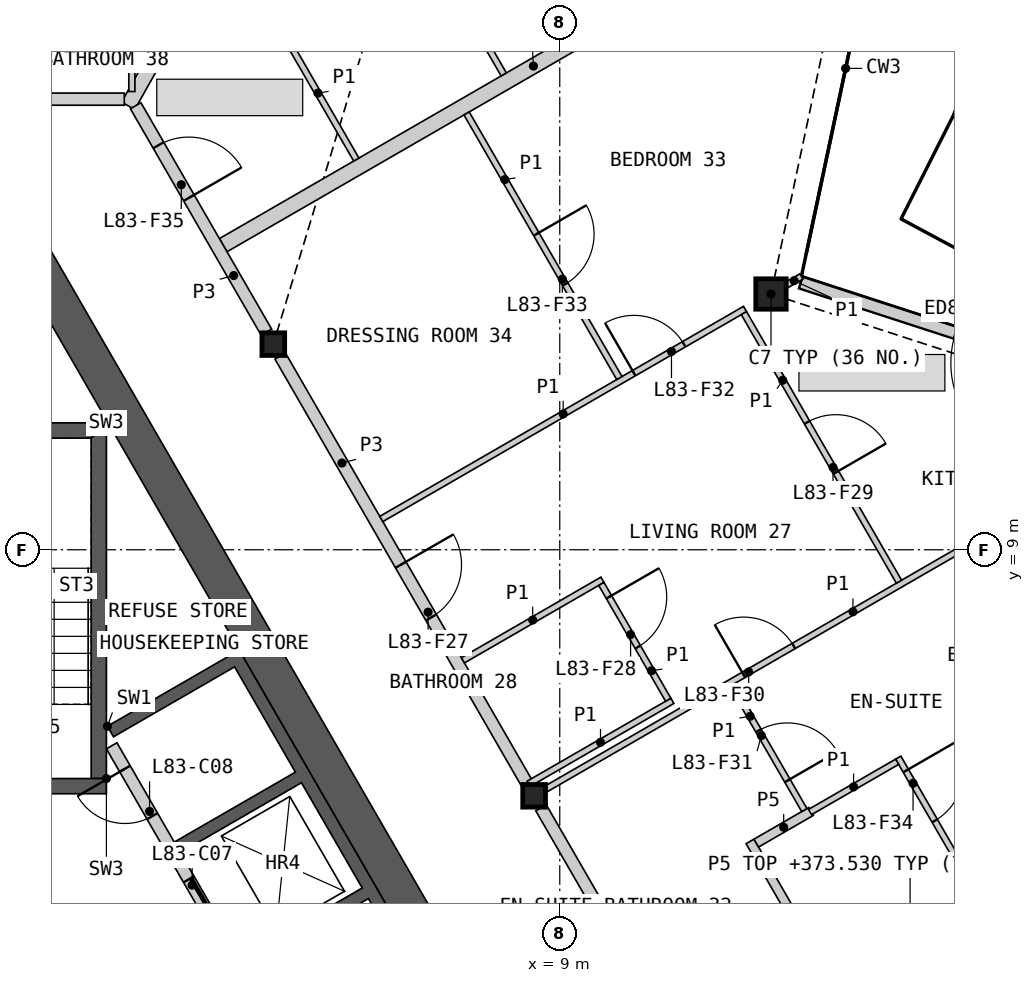
"""IFC4 building model, lengths in metres.
Left out: names, types, materials, properties, quantities, classifications, styles, units other than length and angle.
Written with IfcOpenShell. Run it as: python <this file> out.ifc"""

import sys

from ifc_helpers import new_model, si_unit, direction, frame, frame_2d, origin, origin_2d, place, context, subcontext, project, spatial, polyline, rectangle, hollow_rectangle, i_section, outline, extrude, element, fill, save


model = new_model("IFC4")
c1 = context("Model", 3, precision=1e-05, world=origin(), true_north=direction((0.0, 1.0)))
c2 = subcontext(c1, "Body", "Model", "MODEL_VIEW")
j1 = project(units=[si_unit("LENGTHUNIT", "METRE"), si_unit("PLANEANGLEUNIT", "RADIAN")], contexts=[c1])
p1 = place(None, origin())
s1 = spatial("IfcSite", under=j1, at=p1, CompositionType="ELEMENT")
p2 = place(p1, origin())
s2 = spatial("IfcBuilding", under=s1, at=p2, CompositionType="ELEMENT")
p3 = place(p2, frame((0.0, 0.0, 371.2)))
s3 = spatial("IfcBuildingStorey", under=s2, at=p3, CompositionType="ELEMENT", Elevation=371.2)
p4 = place(p3, frame((12.474, 13.206, 0.0), z_axis=(0.0, 0.0, 1.0), x_axis=(1.0, 0.0, 0.0)))
e1 = element("IfcColumn", 1, at=p4, inside=s3, PredefinedType="COLUMN", context=c2, shape_type="SweptSolid", body=[
    extrude(hollow_rectangle(XDim=0.5, YDim=0.5, WallThickness=0.03, at=origin_2d()), origin(), (0.0, 0.0, 1.0), 3.4),
])
for number, where, z_axis, x_axis in (
    (2, (8.578, 4.953, 0.0), (0.0, 0.0, 1.0), (1.0, 0.0, 0.0)),
    (3, (4.289, 12.382, 0.0), (0.0, 0.0, 1.0), (1.0, 0.0, 0.0)),
):
    element("IfcColumn", number, at=place(p3, frame(where, z_axis=z_axis, x_axis=x_axis)), inside=s3, PredefinedType="COLUMN", context=c2, shape_type="SweptSolid", body=[
        extrude(i_section(OverallWidth=0.374, OverallDepth=0.372, WebThickness=0.016, FlangeThickness=0.026, at=origin_2d()), origin(), (0.0, 0.0, 1.0), 3.4),
    ])
p5 = place(p3, frame((19.25, 11.351, 0.0), z_axis=(0.0, 0.0, 1.0), x_axis=(-0.951060668786, 0.309004214029, 0.0)))
e4 = element("IfcWall", 4, at=p5, inside=s3, PredefinedType="SOLIDWALL", context=c2, shape_type="SweptSolid", body=[
    extrude(rectangle(XDim=6.609, YDim=0.2, at=frame_2d((3.305, 0.0))), origin(), (0.0, 0.0, 1.0), 2.634),
])
p6 = place(p5, frame((2.333, 0.0, 0.0)))
e5 = element("IfcOpeningElement", 5, at=p6, cuts=e4, PredefinedType="OPENING", context=c2, shape_type="SweptSolid", body=[
    extrude(rectangle(XDim=1.6, YDim=2.25, at=frame_2d((0.8, 1.125))), frame((0.0, 0.11, 0.0), z_axis=(0.0, -1.0, 0.0), x_axis=(1.0, 0.0, 0.0)), (0.0, 0.0, 1.0), 0.22),
])
p7 = place(p3, origin())
e6 = element("IfcWall", 6, at=p7, inside=s3, PredefinedType="SHEAR", context=c2, shape_type="SweptSolid", body=[
    extrude(outline(polyline([(1.561, 6.097), (3.731, 7.35), (8.231, -0.444), (6.061, -1.697), (5.96, -1.524), (7.952, -0.374), (6.952, 1.358), (4.96, 0.208), (4.861, 0.381), (6.852, 1.531), (5.852, 3.263), (3.861, 2.113), (3.76, 2.287), (5.752, 3.437), (4.752, 5.169), (2.76, 4.019), (2.66, 4.192), (4.652, 5.342), (3.652, 7.074), (1.66, 5.924), (1.561, 6.097)])), origin(), (0.0, 0.0, 1.0), 3.1),
])
p8 = place(p3, frame((5.817, -1.476, 0.0), z_axis=(0.0, 0.0, 1.0), x_axis=(-0.500002616675, 0.866023893041, 0.0)))
e7 = element("IfcWall", 7, at=p8, inside=s3, PredefinedType="SOLIDWALL", context=c2, shape_type="SweptSolid", body=[
    extrude(rectangle(XDim=8.373, YDim=0.2, at=frame_2d((4.187, 0.0))), origin(), (0.0, 0.0, 1.0), 3.1),
])
p9 = place(p8, frame((0.337, 0.0, 0.0)))
e8 = element("IfcOpeningElement", 8, at=p9, cuts=e7, PredefinedType="OPENING", context=c2, shape_type="SweptSolid", body=[
    extrude(rectangle(XDim=1.1, YDim=2.1, at=frame_2d((0.55, 1.05))), frame((0.0, 0.11, 0.0), z_axis=(0.0, -1.0, 0.0), x_axis=(1.0, 0.0, 0.0)), (0.0, 0.0, 1.0), 0.22),
])
p10 = place(p8, frame((2.537, 0.0, 0.0)))
e9 = element("IfcOpeningElement", 9, at=p10, cuts=e7, PredefinedType="OPENING", context=c2, shape_type="SweptSolid", body=[
    extrude(rectangle(XDim=1.1, YDim=2.1, at=frame_2d((0.55, 1.05))), frame((0.0, 0.11, 0.0), z_axis=(0.0, -1.0, 0.0), x_axis=(1.0, 0.0, 0.0)), (0.0, 0.0, 1.0), 0.22),
])
p11 = place(p8, frame((4.737, 0.0, 0.0)))
e10 = element("IfcOpeningElement", 10, at=p11, cuts=e7, PredefinedType="OPENING", context=c2, shape_type="SweptSolid", body=[
    extrude(rectangle(XDim=1.1, YDim=2.1, at=frame_2d((0.55, 1.05))), frame((0.0, 0.11, 0.0), z_axis=(0.0, -1.0, 0.0), x_axis=(1.0, 0.0, 0.0)), (0.0, 0.0, 1.0), 0.22),
])
p12 = place(p8, frame((7.037, 0.0, 0.0)))
e11 = element("IfcOpeningElement", 11, at=p12, cuts=e7, PredefinedType="OPENING", context=c2, shape_type="SweptSolid", body=[
    extrude(rectangle(XDim=0.9, YDim=2.1, at=frame_2d((0.45, 1.05))), frame((0.0, 0.11, 0.0), z_axis=(0.0, -1.0, 0.0), x_axis=(1.0, 0.0, 0.0)), (0.0, 0.0, 1.0), 0.22),
])
p13 = place(p3, origin())
e12 = element("IfcWall", 12, at=p13, inside=s3, PredefinedType="SHEAR", context=c2, shape_type="SweptSolid", body=[
    extrude(outline(polyline([(1.544, 5.237), (1.544, 11.087), (1.294, 10.837), (1.294, 5.237), (1.544, 5.237)])), origin(), (0.0, 0.0, 1.0), 3.1),
])
p14 = place(p3, origin())
e13 = element("IfcWall", 13, at=p14, inside=s3, PredefinedType="SHEAR", context=c2, shape_type="SweptSolid", body=[
    extrude(outline(polyline([(1.544, 11.087), (-1.544, 11.087), (-1.294, 10.837), (1.294, 10.837), (1.544, 11.087)])), origin(), (0.0, 0.0, 1.0), 3.1),
])
p15 = place(p3, frame((1.544, 5.112, 0.0), z_axis=(0.0, 0.0, 1.0), x_axis=(-1.0, 0.0, 0.0)))
e14 = element("IfcWall", 14, at=p15, inside=s3, PredefinedType="SHEAR", context=c2, shape_type="SweptSolid", body=[
    extrude(rectangle(XDim=3.088, YDim=0.25, at=frame_2d((1.544, 0.0))), origin(), (0.0, 0.0, 1.0), 3.1),
])
p16 = place(p15, frame((0.994, 0.0, 0.0)))
e15 = element("IfcOpeningElement", 15, at=p16, cuts=e14, PredefinedType="OPENING", context=c2, shape_type="SweptSolid", body=[
    extrude(rectangle(XDim=1.1, YDim=2.1, at=frame_2d((0.55, 1.05))), frame((0.0, 0.135, 0.0), z_axis=(0.0, -1.0, 0.0), x_axis=(1.0, 0.0, 0.0)), (0.0, 0.0, 1.0), 0.27),
])
p17 = place(p3, frame((8.686, -0.634, 0.0), z_axis=(0.0, 0.0, 1.0), x_axis=(-0.500004601921, 0.866022746848, 0.0)))
e16 = element("IfcWall", 16, at=p17, inside=s3, PredefinedType="SHEAR", context=c2, shape_type="SweptSolid", body=[
    extrude(rectangle(XDim=16.853, YDim=0.6, at=frame_2d((8.426, 0.0))), origin(), (0.0, 0.0, 1.0), 3.1),
])
p18 = place(p3, frame((1.902, 16.302, 0.0), z_axis=(0.0, 0.0, 1.0), x_axis=(0.491233789602, 0.871027763021, 0.0)))
e17 = element("IfcWall", 17, at=p18, inside=s3, PredefinedType="PARTITIONING", context=c2, shape_type="SweptSolid", body=[
    extrude(rectangle(XDim=14.345, YDim=0.25, at=frame_2d((7.173, 0.0))), origin(), (0.0, 0.0, 1.0), 2.33),
])
p19 = place(p3, frame((3.465, 14.01, 0.0), z_axis=(0.0, 0.0, 1.0), x_axis=(0.866032376801, 0.499987922186, 0.0)))
e18 = element("IfcWall", 18, at=p19, inside=s3, PredefinedType="PARTITIONING", context=c2, shape_type="SweptSolid", body=[
    extrude(rectangle(XDim=11.782, YDim=0.25, at=frame_2d((5.891, 0.0))), origin(), (0.0, 0.0, 1.0), 2.33),
])
p20 = place(p3, frame((4.403, 12.185, 0.0), z_axis=(0.0, 0.0, 1.0), x_axis=(0.499992155518, -0.866029932751, 0.0)))
e19 = element("IfcWall", 19, at=p20, inside=s3, PredefinedType="PARTITIONING", context=c2, shape_type="SweptSolid", body=[
    extrude(rectangle(XDim=8.123, YDim=0.2, at=frame_2d((4.062, 0.0))), origin(), (0.0, 0.0, 1.0), 3.1),
])
p21 = place(p20, frame((3.963, 0.0, 0.0)))
e20 = element("IfcOpeningElement", 20, at=p21, cuts=e19, PredefinedType="OPENING", context=c2, shape_type="SweptSolid", body=[
    extrude(rectangle(XDim=1.0, YDim=2.1, at=frame_2d((0.5, 1.05))), frame((0.0, 0.11, 0.0), z_axis=(0.0, -1.0, 0.0), x_axis=(1.0, 0.0, 0.0)), (0.0, 0.0, 1.0), 0.22),
])
p22 = place(p3, frame((8.692, 4.756, 0.0), z_axis=(0.0, 0.0, 1.0), x_axis=(0.500001682468, -0.866024432409, 0.0)))
e21 = element("IfcWall", 21, at=p22, inside=s3, PredefinedType="PARTITIONING", context=c2, shape_type="SweptSolid", body=[
    extrude(rectangle(XDim=8.124, YDim=0.2, at=frame_2d((4.062, 0.0))), origin(), (0.0, 0.0, 1.0), 3.1),
])
p23 = place(p22, frame((5.97, 0.0, 0.0)))
e22 = element("IfcOpeningElement", 22, at=p23, cuts=e21, PredefinedType="OPENING", context=c2, shape_type="SweptSolid", body=[
    extrude(rectangle(XDim=1.0, YDim=2.1, at=frame_2d((0.5, 1.05))), frame((0.0, 0.11, 0.0), z_axis=(0.0, -1.0, 0.0), x_axis=(1.0, 0.0, 0.0)), (0.0, 0.0, 1.0), 0.22),
])
p24 = place(p3, frame((2.025, 16.303, 0.0), z_axis=(0.0, 0.0, 1.0), x_axis=(0.500004215162, -0.866022970146, 0.0)))
e23 = element("IfcWall", 23, at=p24, inside=s3, PredefinedType="PARTITIONING", context=c2, shape_type="SweptSolid", body=[
    extrude(rectangle(XDim=4.3, YDim=0.2, at=frame_2d((2.15, 0.0))), origin(), (0.0, 0.0, 1.0), 3.1),
])
p25 = place(p24, frame((0.75, 0.0, 0.0)))
e24 = element("IfcOpeningElement", 24, at=p25, cuts=e23, PredefinedType="OPENING", context=c2, shape_type="SweptSolid", body=[
    extrude(rectangle(XDim=1.0, YDim=2.1, at=frame_2d((0.5, 1.05))), frame((0.0, 0.11, 0.0), z_axis=(0.0, -1.0, 0.0), x_axis=(1.0, 0.0, 0.0)), (0.0, 0.0, 1.0), 0.22),
])
p26 = place(p3, frame((-1.863, 16.411, 0.0), z_axis=(0.0, 0.0, 1.0), x_axis=(1.0, 0.0, 0.0)))
e25 = element("IfcWall", 25, at=p26, inside=s3, PredefinedType="PARTITIONING", context=c2, shape_type="SweptSolid", body=[
    extrude(rectangle(XDim=3.701, YDim=0.2, at=frame_2d((1.851, 0.0))), origin(), (0.0, 0.0, 1.0), 3.1),
])
p27 = place(p26, frame((0.25, 0.0, 0.0)))
e26 = element("IfcOpeningElement", 26, at=p27, cuts=e25, PredefinedType="OPENING", context=c2, shape_type="SweptSolid", body=[
    extrude(rectangle(XDim=1.0, YDim=2.1, at=frame_2d((0.5, 1.05))), frame((0.0, 0.11, 0.0), z_axis=(0.0, -1.0, 0.0), x_axis=(1.0, 0.0, 0.0)), (0.0, 0.0, 1.0), 0.22),
])
p28 = place(p3, frame((13.625, 1.862, 0.0), z_axis=(0.0, 0.0, 1.0), x_axis=(0.866013657776, 0.500020344131, 0.0)))
e27 = element("IfcWall", 27, at=p28, inside=s3, PredefinedType="PLUMBINGWALL", context=c2, shape_type="SweptSolid", body=[
    extrude(rectangle(XDim=2.625, YDim=0.15, at=frame_2d((1.312, 0.0))), origin(), (0.0, 0.0, 1.0), 2.33),
])
p29 = place(p3, frame((12.129, 4.203, 0.0), z_axis=(0.0, 0.0, 1.0), x_axis=(0.499993606316, -0.866029095148, 0.0)))
e28 = element("IfcWall", 28, at=p29, inside=s3, PredefinedType="PLUMBINGWALL", context=c2, shape_type="SweptSolid", body=[
    extrude(rectangle(XDim=2.65, YDim=0.15, at=frame_2d((1.325, 0.0))), origin(), (0.0, 0.0, 1.0), 2.33),
])
p30 = place(p3, frame((12.232, 4.175, 0.0), z_axis=(0.0, 0.0, 1.0), x_axis=(0.866056787991, 0.499945637019, 0.0)))
e29 = element("IfcWall", 29, at=p30, inside=s3, PredefinedType="PLUMBINGWALL", context=c2, shape_type="SweptSolid", body=[
    extrude(rectangle(XDim=1.042, YDim=0.15, at=frame_2d((0.521, 0.0))), origin(), (0.0, 0.0, 1.0), 2.33),
])
p31 = place(p3, frame((8.775, 5.066, 0.0), z_axis=(0.0, 0.0, 1.0), x_axis=(0.866023724155, 0.500002909193, 0.0)))
e30 = element("IfcWall", 30, at=p31, inside=s3, PredefinedType="PARTITIONING", context=c2, shape_type="SweptSolid", body=[
    extrude(rectangle(XDim=11.655, YDim=0.1, at=frame_2d((5.827, 0.0))), origin(), (0.0, 0.0, 1.0), 2.33),
])
p32 = place(p31, frame((3.751, 0.0, 0.0)))
e31 = element("IfcOpeningElement", 31, at=p32, cuts=e30, PredefinedType="OPENING", context=c2, shape_type="SweptSolid", body=[
    extrude(rectangle(XDim=0.95, YDim=2.1, at=frame_2d((0.475, 1.05))), frame((0.0, 0.06, 0.0), z_axis=(0.0, -1.0, 0.0), x_axis=(1.0, 0.0, 0.0)), (0.0, 0.0, 1.0), 0.12),
])
p33 = place(p3, frame((6.065, 9.506, 0.0), z_axis=(0.0, 0.0, 1.0), x_axis=(0.866029020252, 0.499993736042, 0.0)))
e32 = element("IfcWall", 32, at=p33, inside=s3, PredefinedType="PARTITIONING", context=c2, shape_type="SweptSolid", body=[
    extrude(rectangle(XDim=6.907, YDim=0.1, at=frame_2d((3.454, 0.0))), origin(), (0.0, 0.0, 1.0), 2.33),
])
p34 = place(p33, frame((4.798, 0.0, 0.0)))
e33 = element("IfcOpeningElement", 33, at=p34, cuts=e32, PredefinedType="OPENING", context=c2, shape_type="SweptSolid", body=[
    extrude(rectangle(XDim=0.95, YDim=2.1, at=frame_2d((0.475, 1.05))), frame((0.0, 0.06, 0.0), z_axis=(0.0, -1.0, 0.0), x_axis=(1.0, 0.0, 0.0)), (0.0, 0.0, 1.0), 0.12),
])
p35 = place(p3, frame((14.567, 5.581, 0.0), z_axis=(0.0, 0.0, 1.0), x_axis=(0.499996545922, -0.866027397988, 0.0)))
e34 = element("IfcWall", 34, at=p35, inside=s3, PredefinedType="PARTITIONING", context=c2, shape_type="SweptSolid", body=[
    extrude(rectangle(XDim=5.5, YDim=0.1, at=frame_2d((2.75, 0.0))), origin(), (0.0, 0.0, 1.0), 2.33),
])
p36 = place(p35, frame((0.25, 0.0, 0.0)))
e35 = element("IfcOpeningElement", 35, at=p36, cuts=e34, PredefinedType="OPENING", context=c2, shape_type="SweptSolid", body=[
    extrude(rectangle(XDim=0.95, YDim=2.1, at=frame_2d((0.475, 1.05))), frame((0.0, 0.06, 0.0), z_axis=(0.0, -1.0, 0.0), x_axis=(1.0, 0.0, 0.0)), (0.0, 0.0, 1.0), 0.12),
])
p37 = place(p3, frame((7.468, 16.176, 0.0), z_axis=(0.0, 0.0, 1.0), x_axis=(0.499990214365, -0.86603105345, 0.0)))
e36 = element("IfcWall", 36, at=p37, inside=s3, PredefinedType="PARTITIONING", context=c2, shape_type="SweptSolid", body=[
    extrude(rectangle(XDim=5.025, YDim=0.1, at=frame_2d((2.512, 0.0))), origin(), (0.0, 0.0, 1.0), 2.33),
])
p38 = place(p37, frame((2.293, 0.0, 0.0)))
e37 = element("IfcOpeningElement", 37, at=p38, cuts=e36, PredefinedType="OPENING", context=c2, shape_type="SweptSolid", body=[
    extrude(rectangle(XDim=0.95, YDim=2.1, at=frame_2d((0.475, 1.05))), frame((0.0, 0.06, 0.0), z_axis=(0.0, -1.0, 0.0), x_axis=(1.0, 0.0, 0.0)), (0.0, 0.0, 1.0), 0.12),
])
p39 = place(p3, frame((12.029, 12.892, 0.0), z_axis=(0.0, 0.0, 1.0), x_axis=(0.500005610874, -0.86602216432, 0.0)))
e38 = element("IfcWall", 38, at=p39, inside=s3, PredefinedType="PARTITIONING", context=c2, shape_type="SweptSolid", body=[
    extrude(rectangle(XDim=5.1, YDim=0.1, at=frame_2d((2.55, 0.0))), origin(), (0.0, 0.0, 1.0), 2.33),
])
p40 = place(p39, frame((2.075, 0.0, 0.0)))
e39 = element("IfcOpeningElement", 39, at=p40, cuts=e38, PredefinedType="OPENING", context=c2, shape_type="SweptSolid", body=[
    extrude(rectangle(XDim=0.95, YDim=2.1, at=frame_2d((0.475, 1.05))), frame((0.0, 0.06, 0.0), z_axis=(0.0, -1.0, 0.0), x_axis=(1.0, 0.0, 0.0)), (0.0, 0.0, 1.0), 0.12),
])
p41 = place(p3, frame((7.407, 7.182, 0.0), z_axis=(0.0, 0.0, 1.0), x_axis=(0.866052124492, 0.499953715521, 0.0)))
e40 = element("IfcWall", 40, at=p41, inside=s3, PredefinedType="PARTITIONING", context=c2, shape_type="SweptSolid", body=[
    extrude(rectangle(XDim=2.65, YDim=0.1, at=frame_2d((1.325, 0.0))), origin(), (0.0, 0.0, 1.0), 2.33),
])
p42 = place(p3, frame((1.963, 16.536, 0.0), z_axis=(0.0, 0.0, 1.0), x_axis=(0.0, 1.0, 0.0)))
e41 = element("IfcWall", 41, at=p42, inside=s3, PredefinedType="PARTITIONING", context=c2, shape_type="SweptSolid", body=[
    extrude(rectangle(XDim=2.625, YDim=0.1, at=frame_2d((1.312, 0.0))), origin(), (0.0, 0.0, 1.0), 2.33),
])
p43 = place(p3, frame((6.817, 19.004, 0.0), z_axis=(0.0, 0.0, 1.0), x_axis=(0.499976333282, -0.866039067339, 0.0)))
e42 = element("IfcWall", 42, at=p43, inside=s3, PredefinedType="PARTITIONING", context=c2, shape_type="SweptSolid", body=[
    extrude(rectangle(XDim=2.525, YDim=0.1, at=frame_2d((1.262, 0.0))), origin(), (0.0, 0.0, 1.0), 2.33),
])
p44 = place(p43, frame((0.25, 0.0, 0.0)))
e43 = element("IfcOpeningElement", 43, at=p44, cuts=e42, PredefinedType="OPENING", context=c2, shape_type="SweptSolid", body=[
    extrude(rectangle(XDim=0.95, YDim=2.1, at=frame_2d((0.475, 1.05))), frame((0.0, 0.06, 0.0), z_axis=(0.0, -1.0, 0.0), x_axis=(1.0, 0.0, 0.0)), (0.0, 0.0, 1.0), 0.12),
])
p45 = place(p3, frame((4.392, 17.604, 0.0), z_axis=(0.0, 0.0, 1.0), x_axis=(0.500048846702, -0.865997200291, 0.0)))
e44 = element("IfcWall", 44, at=p45, inside=s3, PredefinedType="PARTITIONING", context=c2, shape_type="SweptSolid", body=[
    extrude(rectangle(XDim=2.525, YDim=0.1, at=frame_2d((1.263, 0.0))), origin(), (0.0, 0.0, 1.0), 2.33),
])
p46 = place(p3, frame((8.488, 5.15, 0.0), z_axis=(0.0, 0.0, 1.0), x_axis=(0.866027727466, 0.499995975244, 0.0)))
e45 = element("IfcWall", 45, at=p46, inside=s3, PredefinedType="PARTITIONING", context=c2, shape_type="SweptSolid", body=[
    extrude(rectangle(XDim=2.73, YDim=0.1, at=frame_2d((1.365, 0.0))), origin(), (0.0, 0.0, 1.0), 2.33),
])
p47 = place(p3, frame((11.835, 6.775, 0.0), z_axis=(0.0, 0.0, 1.0), x_axis=(0.500030943131, -0.866007538022, 0.0)))
e46 = element("IfcWall", 46, at=p47, inside=s3, PredefinedType="PARTITIONING", context=c2, shape_type="SweptSolid", body=[
    extrude(rectangle(XDim=2.375, YDim=0.1, at=frame_2d((1.188, 0.0))), origin(), (0.0, 0.0, 1.0), 2.33),
])
p48 = place(p47, frame((0.867, 0.0, 0.0)))
e47 = element("IfcOpeningElement", 47, at=p48, cuts=e46, PredefinedType="OPENING", context=c2, shape_type="SweptSolid", body=[
    extrude(rectangle(XDim=0.95, YDim=2.1, at=frame_2d((0.475, 1.05))), frame((0.0, 0.06, 0.0), z_axis=(0.0, -1.0, 0.0), x_axis=(1.0, 0.0, 0.0)), (0.0, 0.0, 1.0), 0.12),
])
p49 = place(p3, frame((9.684, 8.438, 0.0), z_axis=(0.0, 0.0, 1.0), x_axis=(0.499994660107, -0.866028486751, 0.0)))
e48 = element("IfcWall", 48, at=p49, inside=s3, PredefinedType="PARTITIONING", context=c2, shape_type="SweptSolid", body=[
    extrude(rectangle(XDim=2.2, YDim=0.1, at=frame_2d((1.1, 0.0))), origin(), (0.0, 0.0, 1.0), 2.33),
])
p50 = place(p49, frame((0.25, 0.0, 0.0)))
e49 = element("IfcOpeningElement", 49, at=p50, cuts=e48, PredefinedType="OPENING", context=c2, shape_type="SweptSolid", body=[
    extrude(rectangle(XDim=0.95, YDim=2.1, at=frame_2d((0.475, 1.05))), frame((0.0, 0.06, 0.0), z_axis=(0.0, -1.0, 0.0), x_axis=(1.0, 0.0, 0.0)), (0.0, 0.0, 1.0), 0.12),
])
p51 = place(p3, frame((13.116, 4.686, 0.0), z_axis=(0.0, 0.0, 1.0), x_axis=(0.866072496716, 0.499918423778, 0.0)))
e50 = element("IfcWall", 50, at=p51, inside=s3, PredefinedType="PARTITIONING", context=c2, shape_type="SweptSolid", body=[
    extrude(rectangle(XDim=1.654, YDim=0.1, at=frame_2d((0.827, 0.0))), origin(), (0.0, 0.0, 1.0), 2.33),
])
p52 = place(p3, frame((12.734, 13.356, 0.0), z_axis=(0.0, 0.0, 1.0), x_axis=(0.865687176694, 0.50058536945, 0.0)))
e51 = element("IfcWall", 51, at=p52, inside=s3, PredefinedType="PARTITIONING", context=c2, shape_type="SweptSolid", body=[
    extrude(rectangle(XDim=0.278, YDim=0.1, at=frame_2d((0.139, 0.0))), origin(), (0.0, 0.0, 1.0), 2.33),
])
p53 = place(p11, origin())
e52 = element("IfcDoor", 52, at=p53, inside=s3, OperationType="SLIDING_TO_LEFT", PredefinedType="DOOR", context=c2, shape_type="SweptSolid", body=[
    extrude(rectangle(XDim=1.1, YDim=2.1, at=frame_2d((0.55, 1.05))), frame((0.0, 0.025, 0.0), z_axis=(0.0, -1.0, 0.0), x_axis=(1.0, 0.0, 0.0)), (0.0, 0.0, 1.0), 0.05),
])
fill(e10, e52)
p54 = place(p12, origin())
e53 = element("IfcDoor", 53, at=p54, inside=s3, OperationType="SINGLE_SWING_RIGHT", PredefinedType="DOOR", context=c2, shape_type="SweptSolid", body=[
    extrude(rectangle(XDim=0.9, YDim=2.1, at=frame_2d((0.45, 1.05))), frame((0.0, 0.025, 0.0), z_axis=(0.0, -1.0, 0.0), x_axis=(1.0, 0.0, 0.0)), (0.0, 0.0, 1.0), 0.05),
])
fill(e11, e53)
p55 = place(p21, origin())
e54 = element("IfcDoor", 54, at=p55, inside=s3, OperationType="SINGLE_SWING_LEFT", PredefinedType="DOOR", context=c2, shape_type="SweptSolid", body=[
    extrude(rectangle(XDim=1.0, YDim=2.1, at=frame_2d((0.5, 1.05))), frame((0.0, 0.025, 0.0), z_axis=(0.0, -1.0, 0.0), x_axis=(1.0, 0.0, 0.0)), (0.0, 0.0, 1.0), 0.05),
])
fill(e20, e54)
p56 = place(p50, origin())
e55 = element("IfcDoor", 55, at=p56, inside=s3, OperationType="SINGLE_SWING_LEFT", PredefinedType="DOOR", context=c2, shape_type="SweptSolid", body=[
    extrude(rectangle(XDim=0.95, YDim=2.1, at=frame_2d((0.475, 1.05))), frame((0.0, 0.025, 0.0), z_axis=(0.0, -1.0, 0.0), x_axis=(1.0, 0.0, 0.0)), (0.0, 0.0, 1.0), 0.05),
])
fill(e49, e55)
p57 = place(p40, origin())
e56 = element("IfcDoor", 56, at=p57, inside=s3, OperationType="SINGLE_SWING_RIGHT", PredefinedType="DOOR", context=c2, shape_type="SweptSolid", body=[
    extrude(rectangle(XDim=0.95, YDim=2.1, at=frame_2d((0.475, 1.05))), frame((0.0, 0.025, 0.0), z_axis=(0.0, -1.0, 0.0), x_axis=(1.0, 0.0, 0.0)), (0.0, 0.0, 1.0), 0.05),
])
fill(e39, e56)
p58 = place(p32, origin())
e57 = element("IfcDoor", 57, at=p58, inside=s3, OperationType="SINGLE_SWING_LEFT", PredefinedType="DOOR", context=c2, shape_type="SweptSolid", body=[
    extrude(rectangle(XDim=0.95, YDim=2.1, at=frame_2d((0.475, 1.05))), frame((0.0, 0.025, 0.0), z_axis=(0.0, -1.0, 0.0), x_axis=(1.0, 0.0, 0.0)), (0.0, 0.0, 1.0), 0.05),
])
fill(e31, e57)
p59 = place(p48, origin())
e58 = element("IfcDoor", 58, at=p59, inside=s3, OperationType="SINGLE_SWING_RIGHT", PredefinedType="DOOR", context=c2, shape_type="SweptSolid", body=[
    extrude(rectangle(XDim=0.95, YDim=2.1, at=frame_2d((0.475, 1.05))), frame((0.0, 0.025, 0.0), z_axis=(0.0, -1.0, 0.0), x_axis=(1.0, 0.0, 0.0)), (0.0, 0.0, 1.0), 0.05),
])
fill(e47, e58)
p60 = place(p34, origin())
e59 = element("IfcDoor", 59, at=p60, inside=s3, OperationType="SINGLE_SWING_LEFT", PredefinedType="DOOR", context=c2, shape_type="SweptSolid", body=[
    extrude(rectangle(XDim=0.95, YDim=2.1, at=frame_2d((0.475, 1.05))), frame((0.0, 0.025, 0.0), z_axis=(0.0, -1.0, 0.0), x_axis=(1.0, 0.0, 0.0)), (0.0, 0.0, 1.0), 0.05),
])
fill(e33, e59)
p61 = place(p38, origin())
e60 = element("IfcDoor", 60, at=p61, inside=s3, OperationType="SINGLE_SWING_LEFT", PredefinedType="DOOR", context=c2, shape_type="SweptSolid", body=[
    extrude(rectangle(XDim=0.95, YDim=2.1, at=frame_2d((0.475, 1.05))), frame((0.0, 0.025, 0.0), z_axis=(0.0, -1.0, 0.0), x_axis=(1.0, 0.0, 0.0)), (0.0, 0.0, 1.0), 0.05),
])
fill(e37, e60)
p62 = place(p36, origin())
e61 = element("IfcDoor", 61, at=p62, inside=s3, OperationType="SINGLE_SWING_LEFT", PredefinedType="DOOR", context=c2, shape_type="SweptSolid", body=[
    extrude(rectangle(XDim=0.95, YDim=2.1, at=frame_2d((0.475, 1.05))), frame((0.0, 0.025, 0.0), z_axis=(0.0, -1.0, 0.0), x_axis=(1.0, 0.0, 0.0)), (0.0, 0.0, 1.0), 0.05),
])
fill(e35, e61)
p63 = place(p25, origin())
e62 = element("IfcDoor", 62, at=p63, inside=s3, OperationType="SINGLE_SWING_RIGHT", PredefinedType="DOOR", context=c2, shape_type="SweptSolid", body=[
    extrude(rectangle(XDim=1.0, YDim=2.1, at=frame_2d((0.5, 1.05))), frame((0.0, 0.025, 0.0), z_axis=(0.0, -1.0, 0.0), x_axis=(1.0, 0.0, 0.0)), (0.0, 0.0, 1.0), 0.05),
])
fill(e24, e62)
save(model, sys.argv[1])
